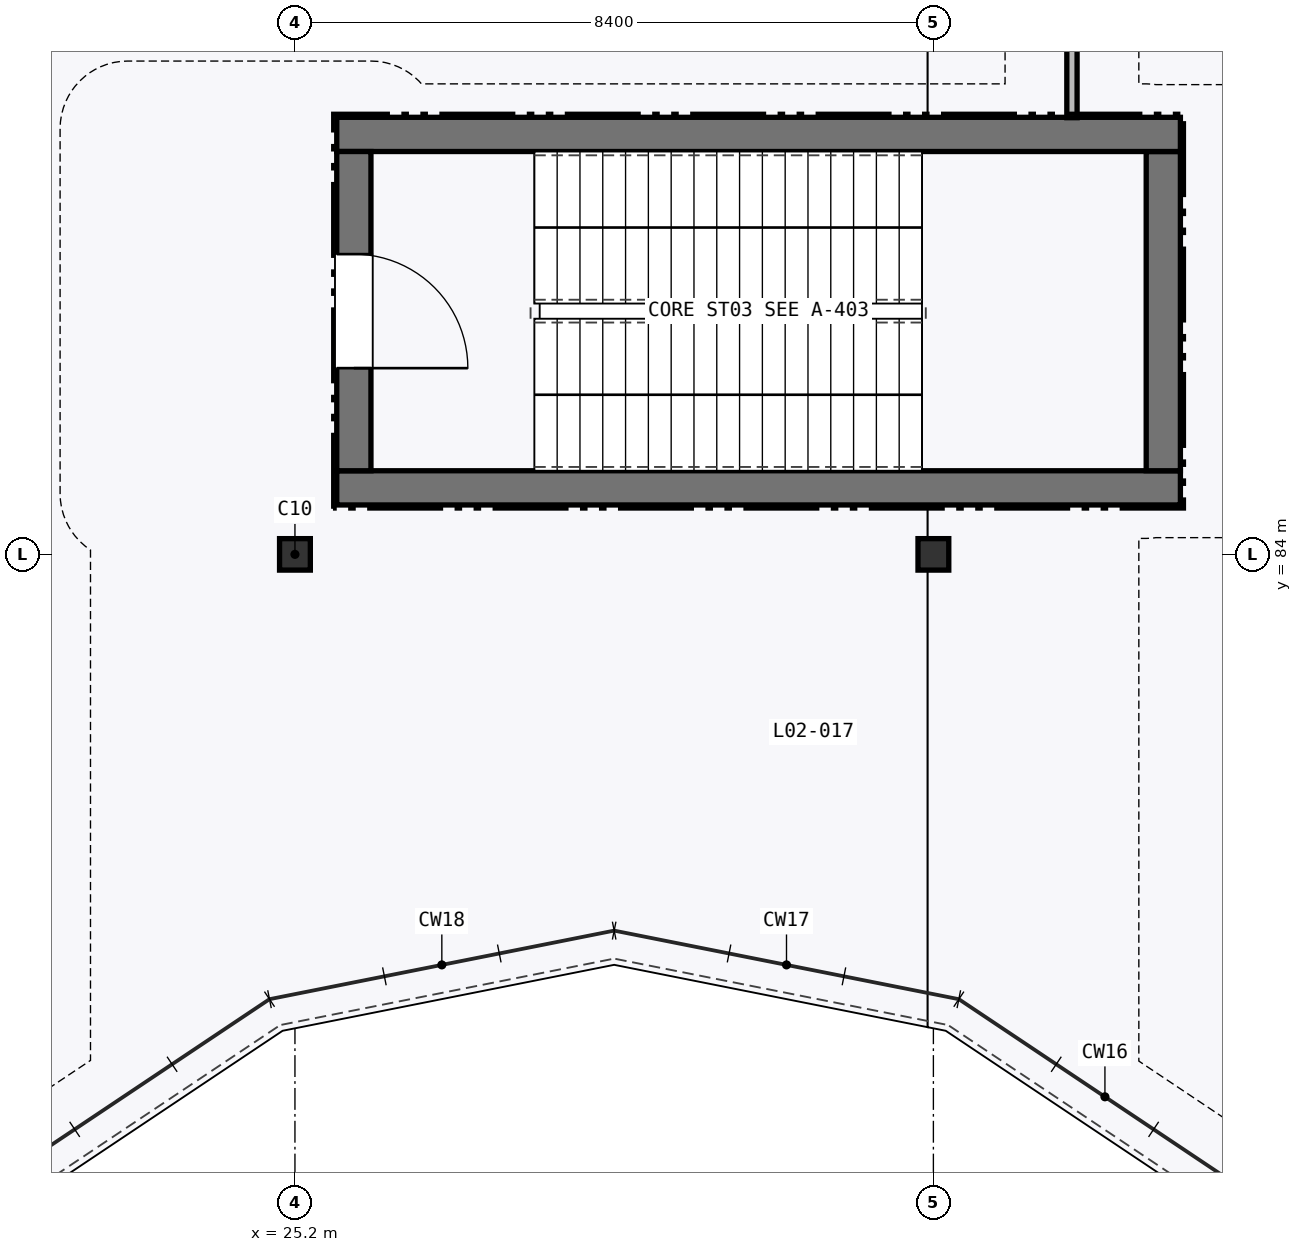
"""IFC4 building model, lengths in metres.
Left out: names, types, materials, properties, quantities, classifications, styles, units other than length and angle.
Written with IfcOpenShell. Run it as: python <this file> out.ifc"""

import sys

from ifc_helpers import new_model, si_unit, direction, frame, frame_2d, origin, origin_2d, place, context, subcontext, project, spatial, rectangle, i_section, extrude, element, fill, save


model = new_model("IFC4")
c1 = context("Model", 3, precision=1e-05, world=origin(), true_north=direction((0.0, 1.0)))
c2 = subcontext(c1, "Body", "Model", "MODEL_VIEW")
j1 = project(units=[si_unit("LENGTHUNIT", "METRE"), si_unit("PLANEANGLEUNIT", "RADIAN")], contexts=[c1])
p1 = place(None, origin())
s1 = spatial("IfcSite", under=j1, at=p1, CompositionType="ELEMENT")
p2 = place(p1, origin())
s2 = spatial("IfcBuilding", under=s1, at=p2, CompositionType="ELEMENT")
p3 = place(p2, frame((0.0, 0.0, 6.0)))
s3 = spatial("IfcBuildingStorey", under=s2, at=p3, CompositionType="ELEMENT", Elevation=6.0)
for number, where, z_axis, x_axis in (
    (1, (25.2, 84.0, 0.0), (0.0, 0.0, 1.0), (1.0, 0.0, 0.0)),
    (2, (33.6, 84.0, 0.0), (0.0, 0.0, 1.0), (1.0, 0.0, 0.0)),
):
    element("IfcColumn", number, at=place(p3, frame(where, z_axis=z_axis, x_axis=x_axis)), inside=s3, PredefinedType="COLUMN", context=c2, shape_type="SweptSolid", body=[
        extrude(i_section(OverallWidth=0.405, OverallDepth=0.414, WebThickness=0.018, FlangeThickness=0.028, FilletRadius=0.022, at=origin_2d()), origin(), (0.0, 0.0, 1.0), 5.4),
    ])
p4 = place(p3, frame((25.75, 84.875, 0.0), z_axis=(0.0, 0.0, 1.0), x_axis=(1.0, 0.0, 0.0)))
e3 = element("IfcWall", 3, at=p4, inside=s3, PredefinedType="SHEAR", context=c2, shape_type="SweptSolid", body=[
    extrude(rectangle(XDim=11.1, YDim=0.45, at=frame_2d((5.55, 0.0))), origin(), (0.0, 0.0, 1.0), 5.145),
])
p5 = place(p3, frame((36.625, 85.1, 0.0), z_axis=(0.0, 0.0, 1.0), x_axis=(0.0, 1.0, 0.0)))
e4 = element("IfcWall", 4, at=p5, inside=s3, PredefinedType="SHEAR", context=c2, shape_type="SweptSolid", body=[
    extrude(rectangle(XDim=4.2, YDim=0.45, at=frame_2d((2.1, 0.0))), origin(), (0.0, 0.0, 1.0), 5.145),
])
p6 = place(p3, frame((36.85, 89.525, 0.0), z_axis=(0.0, 0.0, 1.0), x_axis=(-1.0, 0.0, 0.0)))
e5 = element("IfcWall", 5, at=p6, inside=s3, PredefinedType="SHEAR", context=c2, shape_type="SweptSolid", body=[
    extrude(rectangle(XDim=11.1, YDim=0.45, at=frame_2d((5.55, 0.0))), origin(), (0.0, 0.0, 1.0), 5.145),
])
p7 = place(p3, frame((25.975, 89.3, 0.0), z_axis=(0.0, 0.0, 1.0), x_axis=(0.0, -1.0, 0.0)))
e6 = element("IfcWall", 6, at=p7, inside=s3, PredefinedType="SHEAR", context=c2, shape_type="SweptSolid", body=[
    extrude(rectangle(XDim=4.2, YDim=0.45, at=frame_2d((2.1, 0.0))), origin(), (0.0, 0.0, 1.0), 5.145),
])
p8 = place(p7, frame((1.35, 0.0, 0.0)))
e7 = element("IfcOpeningElement", 7, at=p8, cuts=e6, PredefinedType="OPENING", context=c2, shape_type="SweptSolid", body=[
    extrude(rectangle(XDim=1.5, YDim=2.15, at=frame_2d((0.75, 1.075))), frame((0.0, 0.235, 0.0), z_axis=(0.0, -1.0, 0.0), x_axis=(1.0, 0.0, 0.0)), (0.0, 0.0, 1.0), 0.47),
])
p9 = place(p3, frame((35.423, 89.745, 0.0), z_axis=(0.0, 0.0, 1.0), x_axis=(0.0, 1.0, 0.0)))
e8 = element("IfcWall", 8, at=p9, inside=s3, PredefinedType="PARTITIONING", context=c2, shape_type="SweptSolid", body=[
    extrude(rectangle(XDim=2.52, YDim=0.135, at=frame_2d((1.26, 0.0))), origin(), (0.0, 0.0, 1.0), 5.145),
])
p10 = place(p8, origin())
e9 = element("IfcDoor", 9, at=p10, inside=s3, OperationType="SINGLE_SWING_RIGHT", PredefinedType="DOOR", context=c2, shape_type="SweptSolid", body=[
    extrude(rectangle(XDim=1.5, YDim=2.15, at=frame_2d((0.75, 1.075))), frame((0.0, 0.025, 0.0), z_axis=(0.0, -1.0, 0.0), x_axis=(1.0, 0.0, 0.0)), (0.0, 0.0, 1.0), 0.05),
])
fill(e7, e9)
save(model, sys.argv[1])
